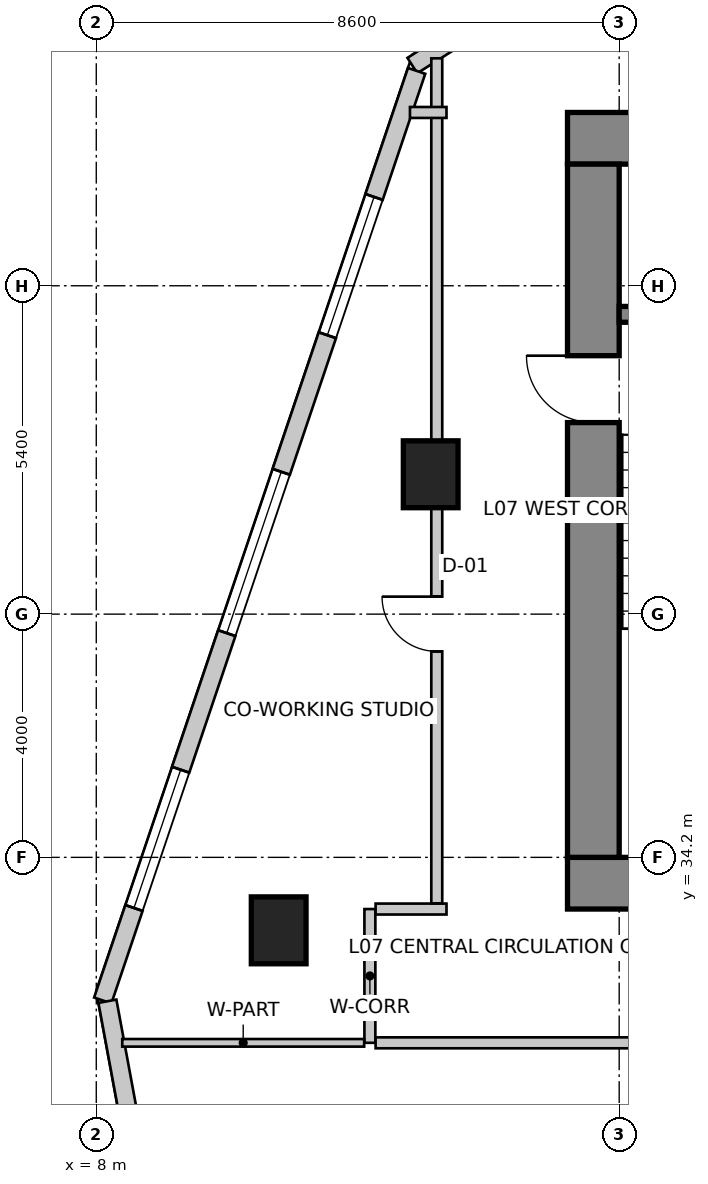
"""IFC4 building model, lengths in metres.
Left out: names, types, materials, properties, quantities, classifications, styles, units other than length and angle.
Written with IfcOpenShell. Run it as: python <this file> out.ifc"""

import sys

from ifc_helpers import new_model, si_unit, direction, frame, frame_2d, origin, origin_2d, place, context, subcontext, project, spatial, rectangle, extrude, source, transform, mapped, element, fill, save


model = new_model("IFC4")
c1 = context("Model", 3, precision=1e-05, world=origin(), true_north=direction((0.0, 1.0)))
c2 = subcontext(c1, "Body", "Model", "MODEL_VIEW")
j1 = project(units=[si_unit("LENGTHUNIT", "METRE"), si_unit("PLANEANGLEUNIT", "RADIAN")], contexts=[c1])
p1 = place(None, origin())
s1 = spatial("IfcSite", under=j1, at=p1, CompositionType="ELEMENT")
p2 = place(p1, origin())
s2 = spatial("IfcBuilding", under=s1, at=p2, CompositionType="ELEMENT")
p3 = place(p2, frame((0.0, 0.0, 31.0)))
s3 = spatial("IfcBuildingStorey", under=s2, at=p3, CompositionType="ELEMENT", Elevation=31.0)
p4 = place(p3, frame((15.75, 46.025, 0.0), z_axis=(0.0, 0.0, 1.0), x_axis=(1.0, 0.0, 0.0)))
e1 = element("IfcWall", 1, at=p4, inside=s3, PredefinedType="SHEAR", context=c2, shape_type="SweptSolid", body=[
    extrude(rectangle(XDim=16.1, YDim=0.85, at=frame_2d((8.05, 0.0))), origin(), (0.0, 0.0, 1.0), 4.0),
])
p5 = place(p3, frame((15.75, 33.775, 0.0), z_axis=(0.0, 0.0, 1.0), x_axis=(1.0, 0.0, 0.0)))
e2 = element("IfcWall", 2, at=p5, inside=s3, PredefinedType="SHEAR", context=c2, shape_type="SweptSolid", body=[
    extrude(rectangle(XDim=16.1, YDim=0.85, at=frame_2d((8.05, 0.0))), origin(), (0.0, 0.0, 1.0), 4.0),
])
m1 = source(origin(), c2, "Body", "SweptSolid", [
    extrude(rectangle(XDim=1.3, YDim=2.15, at=frame_2d((0.65, 1.075))), frame((0.0, 0.435, 0.0), z_axis=(0.0, -1.0, 0.0), x_axis=(1.0, 0.0, 0.0)), (0.0, 0.0, 1.0), 0.87),
])
p6 = place(p5, frame((10.18, 0.0, 0.0)))
e3 = element("IfcOpeningElement", 3, at=p6, cuts=e2, PredefinedType="OPENING", context=c2, shape_type="MappedRepresentation", body=[
    mapped(m1, transform((0.0, 0.0, 0.0), scale=1.0)),
])
p7 = place(p3, frame((16.175, 34.2, 0.0), z_axis=(0.0, 0.0, 1.0), x_axis=(0.0, 1.0, 0.0)))
e4 = element("IfcWall", 4, at=p7, inside=s3, PredefinedType="SHEAR", context=c2, shape_type="SweptSolid", body=[
    extrude(rectangle(XDim=11.4, YDim=0.85, at=frame_2d((5.7, 0.0))), origin(), (0.0, 0.0, 1.0), 4.0),
])
m2 = source(origin(), c2, "Body", "SweptSolid", [
    extrude(rectangle(XDim=1.1, YDim=2.15, at=frame_2d((0.55, 1.075))), frame((0.0, 0.435, 0.0), z_axis=(0.0, -1.0, 0.0), x_axis=(1.0, 0.0, 0.0)), (0.0, 0.0, 1.0), 0.87),
])
p8 = place(p7, frame((7.15, 0.0, 0.0)))
e5 = element("IfcOpeningElement", 5, at=p8, cuts=e4, PredefinedType="OPENING", context=c2, shape_type="MappedRepresentation", body=[
    mapped(m2, transform((0.0, 0.0, 0.0), scale=1.0)),
])
p9 = place(p3, frame((16.6, 43.13, 0.0), z_axis=(0.0, 0.0, 1.0), x_axis=(1.0, 0.0, 0.0)))
e6 = element("IfcWall", 6, at=p9, inside=s3, PredefinedType="SHEAR", context=c2, shape_type="SweptSolid", body=[
    extrude(rectangle(XDim=3.5, YDim=0.26, at=frame_2d((1.75, 0.0))), origin(), (0.0, 0.0, 1.0), 4.0),
])
m3 = source(origin(), c2, "Body", "SweptSolid", [
    extrude(rectangle(XDim=0.9, YDim=1.1, at=origin_2d()), origin(), (0.0, 0.0, 1.0), 4.0),
])
for number, where, z_axis, x_axis in (
    (7, (11.0, 33.0, 0.0), (0.0, 0.0, 1.0), (1.0, 0.0, 0.0)),
    (8, (13.5, 40.5, 0.0), (0.0, 0.0, 1.0), (1.0, 0.0, 0.0)),
):
    element("IfcColumn", number, at=place(p3, frame(where, z_axis=z_axis, x_axis=x_axis)), inside=s3, PredefinedType="COLUMN", context=c2, shape_type="MappedRepresentation", body=[
        mapped(m3, transform((0.0, 0.0, 0.0), scale=1.0)),
    ])
p10 = place(p3, frame((21.875, 52.743, 0.0), z_axis=(0.0, 0.0, 1.0), x_axis=(-0.843647802826, -0.536896996441, 0.0)))
e9 = element("IfcWall", 9, at=p10, inside=s3, PredefinedType="SOLIDWALL", context=c2, shape_type="SweptSolid", body=[
    extrude(rectangle(XDim=10.284, YDim=0.3, at=frame_2d((5.142, 0.0))), origin(), (0.0, 0.0, 1.0), 3.75),
])
m4 = source(origin(), c2, "Body", "SweptSolid", [
    extrude(rectangle(XDim=1.2, YDim=1.6, at=frame_2d((0.6, 0.8))), frame((0.0, 0.16, 0.0), z_axis=(0.0, -1.0, 0.0), x_axis=(1.0, 0.0, 0.0)), (0.0, 0.0, 1.0), 0.32),
])
p11 = place(p10, frame((0.479, 0.0, 0.85)))
e10 = element("IfcOpeningElement", 10, at=p11, cuts=e9, PredefinedType="OPENING", context=c2, shape_type="MappedRepresentation", body=[
    mapped(m4, transform((0.0, 0.0, 0.0), scale=1.0)),
])
m5 = source(origin(), c2, "Body", "SweptSolid", [
    extrude(rectangle(XDim=2.8, YDim=2.4, at=frame_2d((1.4, 1.2))), frame((0.0, 0.16, 0.0), z_axis=(0.0, -1.0, 0.0), x_axis=(1.0, 0.0, 0.0)), (0.0, 0.0, 1.0), 0.32),
])
p12 = place(p10, frame((3.342, 0.0, 0.85)))
e11 = element("IfcOpeningElement", 11, at=p12, cuts=e9, PredefinedType="OPENING", context=c2, shape_type="MappedRepresentation", body=[
    mapped(m5, transform((0.0, 0.0, 0.0), scale=1.0)),
])
m6 = source(origin(), c2, "Body", "SweptSolid", [
    extrude(rectangle(XDim=1.8, YDim=2.1, at=frame_2d((0.9, 1.05))), frame((0.0, 0.16, 0.0), z_axis=(0.0, -1.0, 0.0), x_axis=(1.0, 0.0, 0.0)), (0.0, 0.0, 1.0), 0.32),
])
p13 = place(p10, frame((7.754, 0.0, 0.85)))
e12 = element("IfcOpeningElement", 12, at=p13, cuts=e9, PredefinedType="OPENING", context=c2, shape_type="MappedRepresentation", body=[
    mapped(m6, transform((0.0, 0.0, 0.0), scale=1.0)),
])
p14 = place(p3, frame((13.269, 47.134, 0.0), z_axis=(0.0, 0.0, 1.0), x_axis=(-0.319920423265, -0.947444416722, 0.0)))
e13 = element("IfcWall", 13, at=p14, inside=s3, PredefinedType="SOLIDWALL", context=c2, shape_type="SweptSolid", body=[
    extrude(rectangle(XDim=16.135, YDim=0.3, at=frame_2d((8.067, 0.0))), origin(), (0.0, 0.0, 1.0), 3.75),
])
m7 = source(origin(), c2, "Body", "SweptSolid", [
    extrude(rectangle(XDim=2.4, YDim=2.2, at=frame_2d((1.2, 1.1))), frame((0.0, 0.16, 0.0), z_axis=(0.0, -1.0, 0.0), x_axis=(1.0, 0.0, 0.0)), (0.0, 0.0, 1.0), 0.32),
])
p15 = place(p14, frame((2.188, 0.0, 0.85)))
e14 = element("IfcOpeningElement", 14, at=p15, cuts=e13, PredefinedType="OPENING", context=c2, shape_type="MappedRepresentation", body=[
    mapped(m7, transform((0.0, 0.0, 0.0), scale=1.0)),
])
p16 = place(p14, frame((6.959, 0.0, 0.85)))
e15 = element("IfcOpeningElement", 15, at=p16, cuts=e13, PredefinedType="OPENING", context=c2, shape_type="MappedRepresentation", body=[
    mapped(m5, transform((0.0, 0.0, 0.0), scale=1.0)),
])
p17 = place(p14, frame((12.13, 0.0, 0.85)))
e16 = element("IfcOpeningElement", 16, at=p17, cuts=e13, PredefinedType="OPENING", context=c2, shape_type="MappedRepresentation", body=[
    mapped(m7, transform((0.0, 0.0, 0.0), scale=1.0)),
])
p18 = place(p3, frame((8.183, 31.833, 0.0), z_axis=(0.0, 0.0, 1.0), x_axis=(0.18216364648, -0.983268226834, 0.0)))
e17 = element("IfcWall", 17, at=p18, inside=s3, PredefinedType="SOLIDWALL", context=c2, shape_type="SweptSolid", body=[
    extrude(rectangle(XDim=26.678, YDim=0.3, at=frame_2d((13.339, 0.0))), origin(), (0.0, 0.0, 1.0), 3.75),
])
p19 = place(p18, frame((2.201, 0.0, 0.85)))
e18 = element("IfcOpeningElement", 18, at=p19, cuts=e17, PredefinedType="OPENING", context=c2, shape_type="MappedRepresentation", body=[
    mapped(m5, transform((0.0, 0.0, 0.0), scale=1.0)),
])
p20 = place(p18, frame((7.729, 0.0, 0.85)))
e19 = element("IfcOpeningElement", 19, at=p20, cuts=e17, PredefinedType="OPENING", context=c2, shape_type="MappedRepresentation", body=[
    mapped(m7, transform((0.0, 0.0, 0.0), scale=1.0)),
])
p21 = place(p18, frame((12.857, 0.0, 0.85)))
e20 = element("IfcOpeningElement", 20, at=p21, cuts=e17, PredefinedType="OPENING", context=c2, shape_type="MappedRepresentation", body=[
    mapped(m5, transform((0.0, 0.0, 0.0), scale=1.0)),
])
p22 = place(p18, frame((18.211, 0.0, 0.85)))
e21 = element("IfcOpeningElement", 21, at=p22, cuts=e17, PredefinedType="OPENING", context=c2, shape_type="MappedRepresentation", body=[
    mapped(m5, transform((0.0, 0.0, 0.0), scale=1.0)),
])
p23 = place(p18, frame((22.909, 0.0, 0.85)))
e22 = element("IfcOpeningElement", 22, at=p23, cuts=e17, PredefinedType="OPENING", context=c2, shape_type="MappedRepresentation", body=[
    mapped(m7, transform((0.0, 0.0, 0.0), scale=1.0)),
])
p24 = place(p3, frame((12.5, 31.15, 0.0), z_axis=(0.0, 0.0, 1.0), x_axis=(0.0, 1.0, 0.0)))
e23 = element("IfcWall", 23, at=p24, inside=s3, PredefinedType="PARTITIONING", context=c2, shape_type="SweptSolid", body=[
    extrude(rectangle(XDim=2.2, YDim=0.18, at=frame_2d((1.1, 0.0))), origin(), (0.0, 0.0, 1.0), 3.419),
])
p25 = place(p3, frame((12.594, 33.35, 0.0), z_axis=(0.0, 0.0, 1.0), x_axis=(1.0, 0.0, 0.0)))
e24 = element("IfcWall", 24, at=p25, inside=s3, PredefinedType="PARTITIONING", context=c2, shape_type="SweptSolid", body=[
    extrude(rectangle(XDim=1.166, YDim=0.18, at=frame_2d((0.583, 0.0))), origin(), (0.0, 0.0, 1.0), 3.75),
])
p26 = place(p3, frame((26.76, 31.15, 0.0), z_axis=(0.0, 0.0, 1.0), x_axis=(-1.0, 0.0, 0.0)))
e25 = element("IfcWall", 25, at=p26, inside=s3, PredefinedType="PARTITIONING", context=c2, shape_type="SweptSolid", body=[
    extrude(rectangle(XDim=14.166, YDim=0.18, at=frame_2d((7.083, 0.0))), origin(), (0.0, 0.0, 1.0), 3.419),
])
m8 = source(origin(), c2, "Body", "SweptSolid", [
    extrude(rectangle(XDim=1.4, YDim=2.15, at=frame_2d((0.7, 1.075))), frame((0.0, 0.1, 0.0), z_axis=(0.0, -1.0, 0.0), x_axis=(1.0, 0.0, 0.0)), (0.0, 0.0, 1.0), 0.2),
])
p27 = place(p26, frame((6.323, 0.0, 0.0)))
e26 = element("IfcOpeningElement", 26, at=p27, cuts=e25, PredefinedType="OPENING", context=c2, shape_type="MappedRepresentation", body=[
    mapped(m8, transform((0.0, 0.0, 0.0), scale=1.0)),
])
p28 = place(p3, frame((13.6, 33.444, 0.0), z_axis=(0.0, 0.0, 1.0), x_axis=(0.0, 1.0, 0.0)))
e27 = element("IfcWall", 27, at=p28, inside=s3, PredefinedType="PARTITIONING", context=c2, shape_type="SweptSolid", body=[
    extrude(rectangle(XDim=13.896, YDim=0.18, at=frame_2d((6.948, 0.0))), origin(), (0.0, 0.0, 1.0), 2.892),
])
m9 = source(origin(), c2, "Body", "SweptSolid", [
    extrude(rectangle(XDim=0.9, YDim=2.15, at=frame_2d((0.45, 1.075))), frame((0.0, 0.1, 0.0), z_axis=(0.0, -1.0, 0.0), x_axis=(1.0, 0.0, 0.0)), (0.0, 0.0, 1.0), 0.2),
])
p29 = place(p28, frame((4.144, 0.0, 0.0)))
e28 = element("IfcOpeningElement", 28, at=p29, cuts=e27, PredefinedType="OPENING", context=c2, shape_type="MappedRepresentation", body=[
    mapped(m9, transform((0.0, 0.0, 0.0), scale=1.0)),
])
p30 = place(p3, frame((13.76, 46.45, 0.0), z_axis=(0.0, 0.0, 1.0), x_axis=(-1.0, 0.0, 0.0)))
e29 = element("IfcWall", 29, at=p30, inside=s3, PredefinedType="PARTITIONING", context=c2, shape_type="SweptSolid", body=[
    extrude(rectangle(XDim=0.601, YDim=0.18, at=frame_2d((0.301, 0.0))), origin(), (0.0, 0.0, 1.0), 3.75),
])
p31 = place(p3, frame((12.406, 31.15, 0.0), z_axis=(0.0, 0.0, 1.0), x_axis=(-1.0, 0.0, 0.0)))
e30 = element("IfcWall", 30, at=p31, inside=s3, PredefinedType="PARTITIONING", context=c2, shape_type="SweptSolid", body=[
    extrude(rectangle(XDim=3.979, YDim=0.125, at=frame_2d((1.99, 0.0))), origin(), (0.0, 0.0, 1.0), 2.892),
])
m10 = source(origin(), c2, "Body", "SweptSolid", [
    extrude(rectangle(XDim=2.4, YDim=2.2, at=frame_2d((1.2, 1.1))), frame((0.0, -0.015, 0.0), z_axis=(0.0, -1.0, 0.0), x_axis=(1.0, 0.0, 0.0)), (0.0, 0.0, 1.0), 0.06),
])
p32 = place(p15, origin())
e31 = element("IfcWindow", 31, at=p32, inside=s3, PartitioningType="SINGLE_PANEL", PredefinedType="WINDOW", context=c2, shape_type="MappedRepresentation", body=[
    mapped(m10, transform((0.0, 0.0, 0.0), scale=1.0)),
])
fill(e14, e31)
m11 = source(origin(), c2, "Body", "SweptSolid", [
    extrude(rectangle(XDim=2.8, YDim=2.4, at=frame_2d((1.4, 1.2))), frame((0.0, -0.015, 0.0), z_axis=(0.0, -1.0, 0.0), x_axis=(1.0, 0.0, 0.0)), (0.0, 0.0, 1.0), 0.06),
])
p33 = place(p16, origin())
e32 = element("IfcWindow", 32, at=p33, inside=s3, PartitioningType="SINGLE_PANEL", PredefinedType="WINDOW", context=c2, shape_type="MappedRepresentation", body=[
    mapped(m11, transform((0.0, 0.0, 0.0), scale=1.0)),
])
fill(e15, e32)
p34 = place(p17, origin())
e33 = element("IfcWindow", 33, at=p34, inside=s3, PartitioningType="SINGLE_PANEL", PredefinedType="WINDOW", context=c2, shape_type="MappedRepresentation", body=[
    mapped(m10, transform((0.0, 0.0, 0.0), scale=1.0)),
])
fill(e16, e33)
m12 = source(origin(), c2, "Body", "SweptSolid", [
    extrude(rectangle(XDim=1.1, YDim=2.15, at=frame_2d((0.55, 1.075))), frame((0.0, 0.025, 0.0), z_axis=(0.0, -1.0, 0.0), x_axis=(1.0, 0.0, 0.0)), (0.0, 0.0, 1.0), 0.05),
])
p35 = place(p8, origin())
e34 = element("IfcDoor", 34, at=p35, inside=s3, OperationType="SINGLE_SWING_RIGHT", PredefinedType="DOOR", context=c2, shape_type="MappedRepresentation", body=[
    mapped(m12, transform((0.0, 0.0, 0.0), scale=1.0)),
])
fill(e5, e34)
m13 = source(origin(), c2, "Body", "SweptSolid", [
    extrude(rectangle(XDim=0.9, YDim=2.15, at=frame_2d((0.45, 1.075))), frame((0.0, 0.025, 0.0), z_axis=(0.0, -1.0, 0.0), x_axis=(1.0, 0.0, 0.0)), (0.0, 0.0, 1.0), 0.05),
])
p36 = place(p29, origin())
e35 = element("IfcDoor", 35, at=p36, inside=s3, OperationType="SINGLE_SWING_RIGHT", PredefinedType="DOOR", context=c2, shape_type="MappedRepresentation", body=[
    mapped(m13, transform((0.0, 0.0, 0.0), scale=1.0)),
])
fill(e28, e35)
save(model, sys.argv[1])
